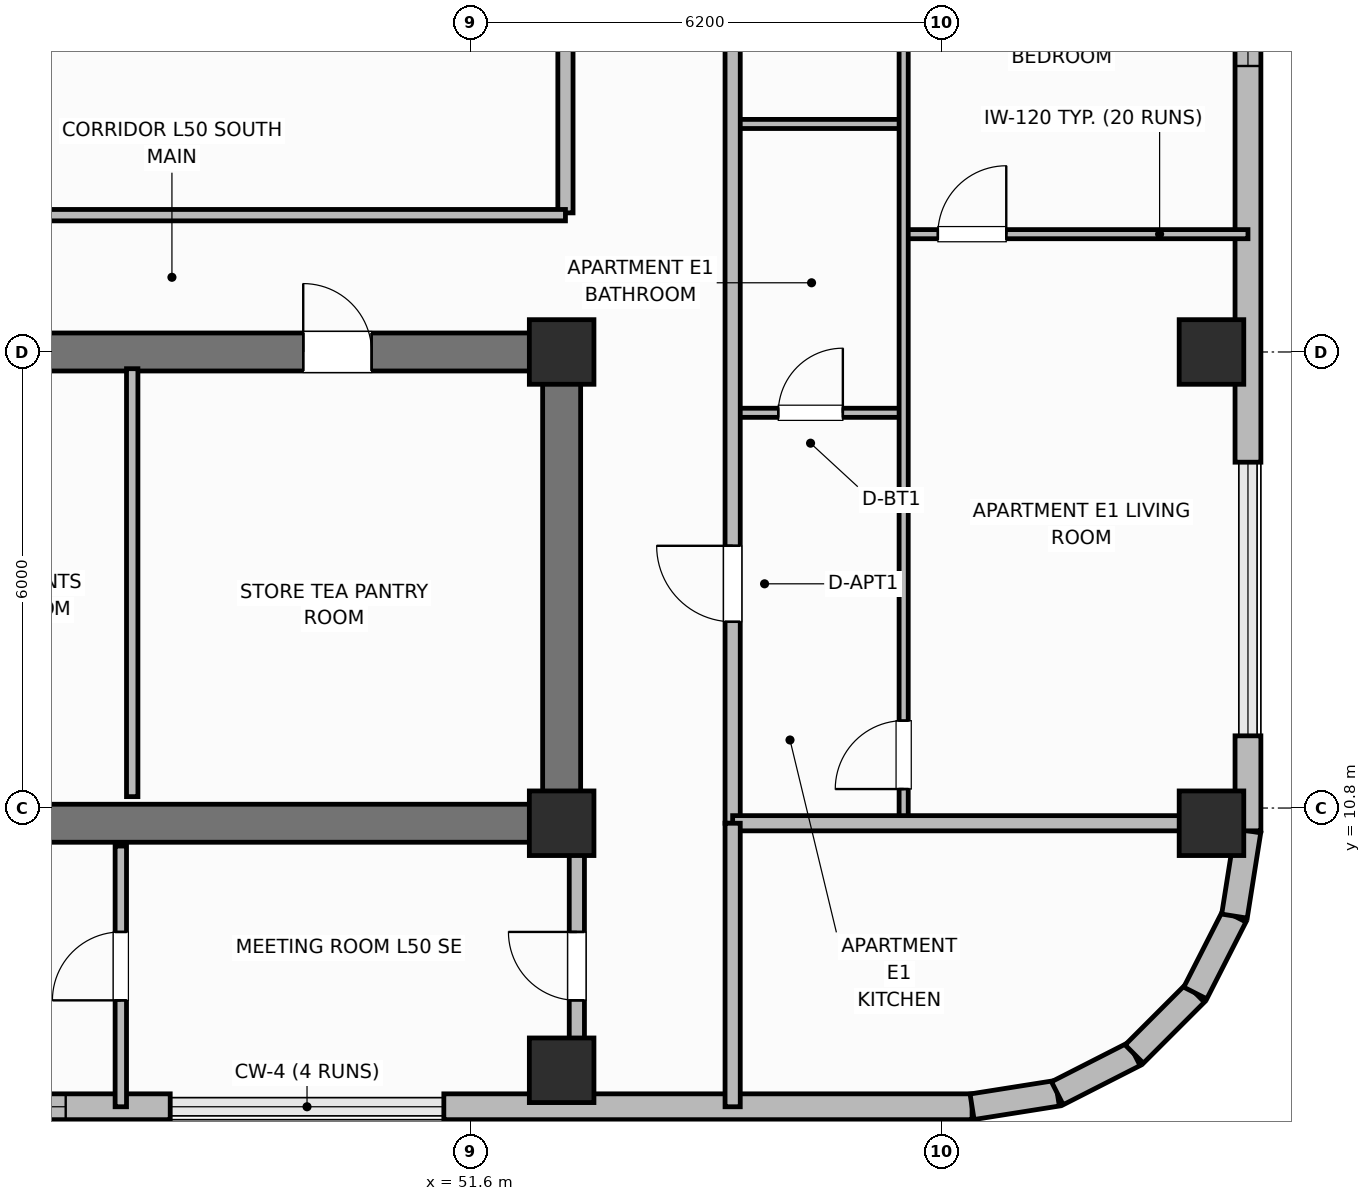
"""IFC4 building model, lengths in metres.
Left out: names, types, materials, properties, quantities, classifications, styles, units other than length and angle.
Written with IfcOpenShell. Run it as: python <this file> out.ifc"""

import sys

from ifc_helpers import new_model, si_unit, direction, frame, frame_2d, origin, origin_2d, place, context, subcontext, project, spatial, rectangle, extrude, element, fill, save


model = new_model("IFC4")
c1 = context("Model", 3, precision=1e-05, world=origin(), true_north=direction((0.0, 1.0)))
c2 = subcontext(c1, "Body", "Model", "MODEL_VIEW")
j1 = project(units=[si_unit("LENGTHUNIT", "METRE"), si_unit("PLANEANGLEUNIT", "RADIAN")], contexts=[c1])
p1 = place(None, origin())
s1 = spatial("IfcSite", under=j1, at=p1, CompositionType="ELEMENT")
p2 = place(p1, origin())
s2 = spatial("IfcBuilding", under=s1, at=p2, CompositionType="ELEMENT")
p3 = place(p2, frame((0.0, 0.0, 203.1)))
s3 = spatial("IfcBuildingStorey", under=s2, at=p3, CompositionType="ELEMENT", Elevation=203.1)
p4 = place(p3, frame((52.8, 10.6, 0.0), z_axis=(0.0, 0.0, 1.0), x_axis=(-1.0, 0.0, 0.0)))
e1 = element("IfcWall", 1, at=p4, inside=s3, PredefinedType="SHEAR", context=c2, shape_type="SweptSolid", body=[
    extrude(rectangle(XDim=27.2, YDim=0.5, at=frame_2d((13.6, 0.0))), origin(), (0.0, 0.0, 1.0), 4.2),
])
p5 = place(p3, frame((52.8, 10.85, 0.0), z_axis=(0.0, 0.0, 1.0), x_axis=(0.0, 1.0, 0.0)))
e2 = element("IfcWall", 2, at=p5, inside=s3, PredefinedType="SHEAR", context=c2, shape_type="SweptSolid", body=[
    extrude(rectangle(XDim=5.7, YDim=0.5, at=frame_2d((2.85, 0.0))), origin(), (0.0, 0.0, 1.0), 4.2),
])
p6 = place(p3, frame((25.6, 16.8, 0.0), z_axis=(0.0, 0.0, 1.0), x_axis=(1.0, 0.0, 0.0)))
e3 = element("IfcWall", 3, at=p6, inside=s3, PredefinedType="SHEAR", context=c2, shape_type="SweptSolid", body=[
    extrude(rectangle(XDim=27.2, YDim=0.5, at=frame_2d((13.6, 0.0))), origin(), (0.0, 0.0, 1.0), 4.2),
])
p7 = place(p6, frame((1.8, 0.0, 0.0)))
e4 = element("IfcOpeningElement", 4, at=p7, cuts=e3, PredefinedType="OPENING", context=c2, shape_type="SweptSolid", body=[
    extrude(rectangle(XDim=1.1, YDim=2.15, at=frame_2d((0.55, 1.075))), frame((0.0, 0.26, 0.0), z_axis=(0.0, -1.0, 0.0), x_axis=(1.0, 0.0, 0.0)), (0.0, 0.0, 1.0), 0.52),
])
p8 = place(p6, frame((5.6, 0.0, 0.0)))
e5 = element("IfcOpeningElement", 5, at=p8, cuts=e3, PredefinedType="OPENING", context=c2, shape_type="SweptSolid", body=[
    extrude(rectangle(XDim=0.85, YDim=2.1, at=frame_2d((0.425, 1.05))), frame((0.0, 0.26, 0.0), z_axis=(0.0, -1.0, 0.0), x_axis=(1.0, 0.0, 0.0)), (0.0, 0.0, 1.0), 0.52),
])
p9 = place(p6, frame((13.0, 0.0, 0.0)))
e6 = element("IfcOpeningElement", 6, at=p9, cuts=e3, PredefinedType="OPENING", context=c2, shape_type="SweptSolid", body=[
    extrude(rectangle(XDim=1.2, YDim=2.15, at=frame_2d((0.6, 1.075))), frame((0.0, 0.26, 0.0), z_axis=(0.0, -1.0, 0.0), x_axis=(1.0, 0.0, 0.0)), (0.0, 0.0, 1.0), 0.52),
])
p10 = place(p6, frame((19.2, 0.0, 0.0)))
e7 = element("IfcOpeningElement", 7, at=p10, cuts=e3, PredefinedType="OPENING", context=c2, shape_type="SweptSolid", body=[
    extrude(rectangle(XDim=0.85, YDim=2.1, at=frame_2d((0.425, 1.05))), frame((0.0, 0.26, 0.0), z_axis=(0.0, -1.0, 0.0), x_axis=(1.0, 0.0, 0.0)), (0.0, 0.0, 1.0), 0.52),
])
p11 = place(p6, frame((23.8, 0.0, 0.0)))
e8 = element("IfcOpeningElement", 8, at=p11, cuts=e3, PredefinedType="OPENING", context=c2, shape_type="SweptSolid", body=[
    extrude(rectangle(XDim=0.9, YDim=2.1, at=frame_2d((0.45, 1.05))), frame((0.0, 0.26, 0.0), z_axis=(0.0, -1.0, 0.0), x_axis=(1.0, 0.0, 0.0)), (0.0, 0.0, 1.0), 0.52),
])
for number, where, z_axis, x_axis in (
    (9, (52.8, 10.6, 0.0), (0.0, 0.0, 1.0), (1.0, 0.0, 0.0)),
    (10, (52.8, 16.8, 0.0), (0.0, 0.0, 1.0), (1.0, 0.0, 0.0)),
    (11, (52.8, 7.35, 0.0), (0.0, 0.0, 1.0), (1.0, 0.0, 0.0)),
    (12, (61.35, 10.6, 0.0), (0.0, 0.0, 1.0), (1.0, 0.0, 0.0)),
    (13, (61.35, 16.8, 0.0), (0.0, 0.0, 1.0), (1.0, 0.0, 0.0)),
):
    element("IfcColumn", number, at=place(p3, frame(where, z_axis=z_axis, x_axis=x_axis)), inside=s3, PredefinedType="COLUMN", context=c2, shape_type="SweptSolid", body=[
        extrude(rectangle(XDim=0.85, YDim=0.85, at=origin_2d()), origin(), (0.0, 0.0, 1.0), 4.2),
    ])
p12 = place(p3, frame((42.4, 6.87, 0.0), z_axis=(0.0, 0.0, 1.0), x_axis=(1.0, 0.0, 0.0)))
e14 = element("IfcWall", 14, at=p12, inside=s3, PredefinedType="SOLIDWALL", context=c2, shape_type="SweptSolid", body=[
    extrude(rectangle(XDim=5.25, YDim=0.34, at=frame_2d((2.625, 0.0))), origin(), (0.0, 0.0, 1.0), 3.22),
])
p13 = place(p12, frame((2.075, 0.0, 0.85)))
e15 = element("IfcOpeningElement", 15, at=p13, cuts=e14, PredefinedType="OPENING", context=c2, shape_type="SweptSolid", body=[
    extrude(rectangle(XDim=1.8, YDim=1.85, at=frame_2d((0.9, 0.925))), frame((0.0, 0.18, 0.0), z_axis=(0.0, -1.0, 0.0), x_axis=(1.0, 0.0, 0.0)), (0.0, 0.0, 1.0), 0.36),
])
p14 = place(p3, frame((51.25, 6.87, 0.0), z_axis=(0.0, 0.0, 1.0), x_axis=(1.0, 0.0, 0.0)))
e16 = element("IfcWall", 16, at=p14, inside=s3, PredefinedType="SOLIDWALL", context=c2, shape_type="SweptSolid", body=[
    extrude(rectangle(XDim=6.95, YDim=0.34, at=frame_2d((3.475, 0.0))), origin(), (0.0, 0.0, 1.0), 3.22),
])
for number, where, z_axis, x_axis in (
    (17, (58.2, 6.87, 0.0), (0.0, 0.0, 1.0), (0.988, 0.156, 0.0)),
    (18, (59.322, 7.048, 0.0), (0.0, 0.0, 1.0), (0.891, 0.454, 0.0)),
):
    element("IfcWall", number, at=place(p3, frame(where, z_axis=z_axis, x_axis=x_axis)), inside=s3, PredefinedType="SOLIDWALL", context=c2, shape_type="SweptSolid", body=[
        extrude(rectangle(XDim=1.136, YDim=0.34, at=frame_2d((0.568, 0.0))), origin(), (0.0, 0.0, 1.0), 3.22),
    ])
p15 = place(p3, frame((60.334, 7.563, 0.0), z_axis=(0.0, 0.0, 1.0), x_axis=(0.707106781187, 0.707106781187, 0.0)))
e19 = element("IfcWall", 19, at=p15, inside=s3, PredefinedType="SOLIDWALL", context=c2, shape_type="SweptSolid", body=[
    extrude(rectangle(XDim=1.135, YDim=0.34, at=frame_2d((0.568, 0.0))), origin(), (0.0, 0.0, 1.0), 3.22),
])
p16 = place(p3, frame((61.137, 8.366, 0.0), z_axis=(0.0, 0.0, 1.0), x_axis=(0.45390646422, 0.891049337433, 0.0)))
e20 = element("IfcWall", 20, at=p16, inside=s3, PredefinedType="SOLIDWALL", context=c2, shape_type="SweptSolid", body=[
    extrude(rectangle(XDim=1.136, YDim=0.34, at=frame_2d((0.568, 0.0))), origin(), (0.0, 0.0, 1.0), 3.22),
])
p17 = place(p3, frame((61.652, 9.378, 0.0), z_axis=(0.0, 0.0, 1.0), x_axis=(0.156514556949, 0.987675651954, 0.0)))
e21 = element("IfcWall", 21, at=p17, inside=s3, PredefinedType="SOLIDWALL", context=c2, shape_type="SweptSolid", body=[
    extrude(rectangle(XDim=1.135, YDim=0.34, at=frame_2d((0.568, 0.0))), origin(), (0.0, 0.0, 1.0), 3.22),
])
p18 = place(p3, frame((61.83, 10.5, 0.0), z_axis=(0.0, 0.0, 1.0), x_axis=(0.0, 1.0, 0.0)))
e22 = element("IfcWall", 22, at=p18, inside=s3, PredefinedType="SOLIDWALL", context=c2, shape_type="SweptSolid", body=[
    extrude(rectangle(XDim=1.25, YDim=0.34, at=frame_2d((0.625, 0.0))), origin(), (0.0, 0.0, 1.0), 3.22),
])
p19 = place(p3, frame((61.83, 15.35, 0.0), z_axis=(0.0, 0.0, 1.0), x_axis=(0.0, 1.0, 0.0)))
e23 = element("IfcWall", 23, at=p19, inside=s3, PredefinedType="SOLIDWALL", context=c2, shape_type="SweptSolid", body=[
    extrude(rectangle(XDim=8.45, YDim=0.34, at=frame_2d((4.225, 0.0))), origin(), (0.0, 0.0, 1.0), 3.22),
])
p20 = place(p19, frame((5.212, 0.0, 0.85)))
e24 = element("IfcOpeningElement", 24, at=p20, cuts=e23, PredefinedType="OPENING", context=c2, shape_type="SweptSolid", body=[
    extrude(rectangle(XDim=1.6, YDim=1.9, at=frame_2d((0.8, 0.95))), frame((0.0, 0.18, 0.0), z_axis=(0.0, -1.0, 0.0), x_axis=(1.0, 0.0, 0.0)), (0.0, 0.0, 1.0), 0.36),
])
p21 = place(p3, frame((47.15, 10.95, 0.0), z_axis=(0.0, 0.0, 1.0), x_axis=(0.0, 1.0, 0.0)))
e25 = element("IfcWall", 25, at=p21, inside=s3, PredefinedType="PARTITIONING", context=c2, shape_type="SweptSolid", body=[
    extrude(rectangle(XDim=5.63, YDim=0.15, at=frame_2d((2.815, 0.0))), origin(), (0.0, 0.0, 1.0), 3.05),
])
p22 = place(p3, frame((52.85, 18.63, 0.0), z_axis=(0.0, 0.0, 1.0), x_axis=(0.0, 1.0, 0.0)))
e26 = element("IfcWall", 26, at=p22, inside=s3, PredefinedType="PARTITIONING", context=c2, shape_type="SweptSolid", body=[
    extrude(rectangle(XDim=19.14, YDim=0.2, at=frame_2d((9.57, 0.0))), origin(), (0.0, 0.0, 1.0), 3.05),
])
p23 = place(p3, frame((31.35, 18.6, 0.0), z_axis=(0.0, 0.0, 1.0), x_axis=(1.0, 0.0, 0.0)))
e27 = element("IfcWall", 27, at=p23, inside=s3, PredefinedType="PARTITIONING", context=c2, shape_type="SweptSolid", body=[
    extrude(rectangle(XDim=21.5, YDim=0.15, at=frame_2d((10.75, 0.0))), origin(), (0.0, 0.0, 1.0), 3.05),
])
p24 = place(p3, frame((55.05, 16.0, 0.0), z_axis=(0.0, 0.0, 1.0), x_axis=(1.0, 0.0, 0.0)))
e28 = element("IfcWall", 28, at=p24, inside=s3, PredefinedType="PARTITIONING", context=c2, shape_type="SweptSolid", body=[
    extrude(rectangle(XDim=2.25, YDim=0.12, at=frame_2d((1.125, 0.0))), origin(), (0.0, 0.0, 1.0), 3.05),
])
p25 = place(p24, frame((0.6, 0.0, 0.0)))
e29 = element("IfcOpeningElement", 29, at=p25, cuts=e28, PredefinedType="OPENING", context=c2, shape_type="SweptSolid", body=[
    extrude(rectangle(XDim=0.85, YDim=2.1, at=frame_2d((0.425, 1.05))), frame((0.0, 0.07, 0.0), z_axis=(0.0, -1.0, 0.0), x_axis=(1.0, 0.0, 0.0)), (0.0, 0.0, 1.0), 0.14),
])
p26 = place(p3, frame((55.05, 19.8, 0.0), z_axis=(0.0, 0.0, 1.0), x_axis=(1.0, 0.0, 0.0)))
e30 = element("IfcWall", 30, at=p26, inside=s3, PredefinedType="PARTITIONING", context=c2, shape_type="SweptSolid", body=[
    extrude(rectangle(XDim=2.25, YDim=0.12, at=frame_2d((1.125, 0.0))), origin(), (0.0, 0.0, 1.0), 3.05),
])
p27 = place(p3, frame((57.3, 18.35, 0.0), z_axis=(0.0, 0.0, 1.0), x_axis=(1.0, 0.0, 0.0)))
e31 = element("IfcWall", 31, at=p27, inside=s3, PredefinedType="PARTITIONING", context=c2, shape_type="SweptSolid", body=[
    extrude(rectangle(XDim=4.53, YDim=0.12, at=frame_2d((2.265, 0.0))), origin(), (0.0, 0.0, 1.0), 3.05),
])
p28 = place(p27, frame((0.45, 0.0, 0.0)))
e32 = element("IfcOpeningElement", 32, at=p28, cuts=e31, PredefinedType="OPENING", context=c2, shape_type="SweptSolid", body=[
    extrude(rectangle(XDim=0.9, YDim=2.1, at=frame_2d((0.45, 1.05))), frame((0.0, 0.07, 0.0), z_axis=(0.0, -1.0, 0.0), x_axis=(1.0, 0.0, 0.0)), (0.0, 0.0, 1.0), 0.14),
])
p29 = place(p3, frame((57.3, 10.64, 0.0), z_axis=(0.0, 0.0, 1.0), x_axis=(0.0, 1.0, 0.0)))
e33 = element("IfcWall", 33, at=p29, inside=s3, PredefinedType="PARTITIONING", context=c2, shape_type="SweptSolid", body=[
    extrude(rectangle(XDim=19.12, YDim=0.12, at=frame_2d((9.56, 0.0))), origin(), (0.0, 0.0, 1.0), 3.05),
])
p30 = place(p29, frame((0.41, 0.0, 0.0)))
e34 = element("IfcOpeningElement", 34, at=p30, cuts=e33, PredefinedType="OPENING", context=c2, shape_type="SweptSolid", body=[
    extrude(rectangle(XDim=0.9, YDim=2.1, at=frame_2d((0.45, 1.05))), frame((0.0, 0.07, 0.0), z_axis=(0.0, -1.0, 0.0), x_axis=(1.0, 0.0, 0.0)), (0.0, 0.0, 1.0), 0.14),
])
p31 = place(p29, frame((13.735, 0.0, 0.0)))
e35 = element("IfcOpeningElement", 35, at=p31, cuts=e33, PredefinedType="OPENING", context=c2, shape_type="SweptSolid", body=[
    extrude(rectangle(XDim=0.82, YDim=2.08, at=frame_2d((0.41, 1.04))), frame((0.0, 0.07, 0.0), z_axis=(0.0, -1.0, 0.0), x_axis=(1.0, 0.0, 0.0)), (0.0, 0.0, 1.0), 0.14),
])
p32 = place(p3, frame((55.05, 10.6, 0.0), z_axis=(0.0, 0.0, 1.0), x_axis=(0.0, 1.0, 0.0)))
e36 = element("IfcWall", 36, at=p32, inside=s3, PredefinedType="PARTITIONING", context=c2, shape_type="SweptSolid", body=[
    extrude(rectangle(XDim=35.2, YDim=0.2, at=frame_2d((17.6, 0.0))), origin(), (0.0, 0.0, 1.0), 3.05),
])
p33 = place(p32, frame((2.65, 0.0, 0.0)))
e37 = element("IfcOpeningElement", 37, at=p33, cuts=e36, PredefinedType="OPENING", context=c2, shape_type="SweptSolid", body=[
    extrude(rectangle(XDim=1.0, YDim=2.15, at=frame_2d((0.5, 1.075))), frame((0.0, 0.11, 0.0), z_axis=(0.0, -1.0, 0.0), x_axis=(1.0, 0.0, 0.0)), (0.0, 0.0, 1.0), 0.22),
])
p34 = place(p32, frame((22.75, 0.0, 0.0)))
e38 = element("IfcOpeningElement", 38, at=p34, cuts=e36, PredefinedType="OPENING", context=c2, shape_type="SweptSolid", body=[
    extrude(rectangle(XDim=1.0, YDim=2.15, at=frame_2d((0.5, 1.075))), frame((0.0, 0.11, 0.0), z_axis=(0.0, -1.0, 0.0), x_axis=(1.0, 0.0, 0.0)), (0.0, 0.0, 1.0), 0.22),
])
p35 = place(p3, frame((55.05, 10.6, 0.0), z_axis=(0.0, 0.0, 1.0), x_axis=(1.0, 0.0, 0.0)))
e39 = element("IfcWall", 39, at=p35, inside=s3, PredefinedType="PARTITIONING", context=c2, shape_type="SweptSolid", body=[
    extrude(rectangle(XDim=6.36, YDim=0.2, at=frame_2d((3.18, 0.0))), origin(), (0.0, 0.0, 1.0), 3.05),
])
p36 = place(p3, frame((55.05, 6.87, 0.0), z_axis=(0.0, 0.0, 1.0), x_axis=(0.0, 1.0, 0.0)))
e40 = element("IfcWall", 40, at=p36, inside=s3, PredefinedType="PARTITIONING", context=c2, shape_type="SweptSolid", body=[
    extrude(rectangle(XDim=3.73, YDim=0.2, at=frame_2d((1.865, 0.0))), origin(), (0.0, 0.0, 1.0), 3.05),
])
p37 = place(p3, frame((47.0, 6.87, 0.0), z_axis=(0.0, 0.0, 1.0), x_axis=(0.0, 1.0, 0.0)))
e41 = element("IfcWall", 41, at=p37, inside=s3, PredefinedType="PARTITIONING", context=c2, shape_type="SweptSolid", body=[
    extrude(rectangle(XDim=3.43, YDim=0.15, at=frame_2d((1.715, 0.0))), origin(), (0.0, 0.0, 1.0), 3.05),
])
p38 = place(p37, frame((1.4, 0.0, 0.0)))
e42 = element("IfcOpeningElement", 42, at=p38, cuts=e41, PredefinedType="OPENING", context=c2, shape_type="SweptSolid", body=[
    extrude(rectangle(XDim=0.9, YDim=2.1, at=frame_2d((0.45, 1.05))), frame((0.0, 0.085, 0.0), z_axis=(0.0, -1.0, 0.0), x_axis=(1.0, 0.0, 0.0)), (0.0, 0.0, 1.0), 0.17),
])
p39 = place(p3, frame((53.0, 7.62, 0.0), z_axis=(0.0, 0.0, 1.0), x_axis=(0.0, 1.0, 0.0)))
e43 = element("IfcWall", 43, at=p39, inside=s3, PredefinedType="PARTITIONING", context=c2, shape_type="SweptSolid", body=[
    extrude(rectangle(XDim=2.68, YDim=0.2, at=frame_2d((1.34, 0.0))), origin(), (0.0, 0.0, 1.0), 3.05),
])
p40 = place(p39, frame((0.65, 0.0, 0.0)))
e44 = element("IfcOpeningElement", 44, at=p40, cuts=e43, PredefinedType="OPENING", context=c2, shape_type="SweptSolid", body=[
    extrude(rectangle(XDim=0.9, YDim=2.1, at=frame_2d((0.45, 1.05))), frame((0.0, 0.11, 0.0), z_axis=(0.0, -1.0, 0.0), x_axis=(1.0, 0.0, 0.0)), (0.0, 0.0, 1.0), 0.22),
])
p41 = place(p13, origin())
e45 = element("IfcWindow", 45, at=p41, inside=s3, PartitioningType="SINGLE_PANEL", PredefinedType="WINDOW", context=c2, shape_type="SweptSolid", body=[
    extrude(rectangle(XDim=1.8, YDim=1.85, at=frame_2d((0.9, 0.925))), frame((0.0, 0.03, 0.0), z_axis=(0.0, -1.0, 0.0), x_axis=(1.0, 0.0, 0.0)), (0.0, 0.0, 1.0), 0.06),
])
fill(e15, e45)
p42 = place(p20, origin())
e46 = element("IfcWindow", 46, at=p42, inside=s3, PartitioningType="SINGLE_PANEL", PredefinedType="WINDOW", context=c2, shape_type="SweptSolid", body=[
    extrude(rectangle(XDim=1.6, YDim=1.9, at=frame_2d((0.8, 0.95))), frame((0.0, 0.03, 0.0), z_axis=(0.0, -1.0, 0.0), x_axis=(1.0, 0.0, 0.0)), (0.0, 0.0, 1.0), 0.06),
])
fill(e24, e46)
p43 = place(p25, origin())
e47 = element("IfcDoor", 47, at=p43, inside=s3, OperationType="SINGLE_SWING_RIGHT", PredefinedType="DOOR", context=c2, shape_type="SweptSolid", body=[
    extrude(rectangle(XDim=0.85, YDim=2.1, at=frame_2d((0.425, 1.05))), frame((0.0, 0.025, 0.0), z_axis=(0.0, -1.0, 0.0), x_axis=(1.0, 0.0, 0.0)), (0.0, 0.0, 1.0), 0.05),
])
fill(e29, e47)
p44 = place(p28, origin())
e48 = element("IfcDoor", 48, at=p44, inside=s3, OperationType="SINGLE_SWING_RIGHT", PredefinedType="DOOR", context=c2, shape_type="SweptSolid", body=[
    extrude(rectangle(XDim=0.9, YDim=2.1, at=frame_2d((0.45, 1.05))), frame((0.0, 0.025, 0.0), z_axis=(0.0, -1.0, 0.0), x_axis=(1.0, 0.0, 0.0)), (0.0, 0.0, 1.0), 0.05),
])
fill(e32, e48)
p45 = place(p30, origin())
e49 = element("IfcDoor", 49, at=p45, inside=s3, OperationType="SINGLE_SWING_LEFT", PredefinedType="DOOR", context=c2, shape_type="SweptSolid", body=[
    extrude(rectangle(XDim=0.9, YDim=2.1, at=frame_2d((0.45, 1.05))), frame((0.0, 0.025, 0.0), z_axis=(0.0, -1.0, 0.0), x_axis=(1.0, 0.0, 0.0)), (0.0, 0.0, 1.0), 0.05),
])
fill(e34, e49)
p46 = place(p33, origin())
e50 = element("IfcDoor", 50, at=p46, inside=s3, OperationType="SINGLE_SWING_RIGHT", PredefinedType="DOOR", context=c2, shape_type="SweptSolid", body=[
    extrude(rectangle(XDim=1.0, YDim=2.15, at=frame_2d((0.5, 1.075))), frame((0.0, 0.025, 0.0), z_axis=(0.0, -1.0, 0.0), x_axis=(1.0, 0.0, 0.0)), (0.0, 0.0, 1.0), 0.05),
])
fill(e37, e50)
p47 = place(p38, origin())
e51 = element("IfcDoor", 51, at=p47, inside=s3, OperationType="SINGLE_SWING_LEFT", PredefinedType="DOOR", context=c2, shape_type="SweptSolid", body=[
    extrude(rectangle(XDim=0.9, YDim=2.1, at=frame_2d((0.45, 1.05))), frame((0.0, 0.025, 0.0), z_axis=(0.0, -1.0, 0.0), x_axis=(1.0, 0.0, 0.0)), (0.0, 0.0, 1.0), 0.05),
])
fill(e42, e51)
p48 = place(p40, origin())
e52 = element("IfcDoor", 52, at=p48, inside=s3, OperationType="SINGLE_SWING_RIGHT", PredefinedType="DOOR", context=c2, shape_type="SweptSolid", body=[
    extrude(rectangle(XDim=0.9, YDim=2.1, at=frame_2d((0.45, 1.05))), frame((0.0, 0.025, 0.0), z_axis=(0.0, -1.0, 0.0), x_axis=(1.0, 0.0, 0.0)), (0.0, 0.0, 1.0), 0.05),
])
fill(e44, e52)
p49 = place(p11, origin())
e53 = element("IfcDoor", 53, at=p49, inside=s3, OperationType="SINGLE_SWING_LEFT", PredefinedType="DOOR", context=c2, shape_type="SweptSolid", body=[
    extrude(rectangle(XDim=0.9, YDim=2.1, at=frame_2d((0.45, 1.05))), frame((0.0, 0.025, 0.0), z_axis=(0.0, -1.0, 0.0), x_axis=(1.0, 0.0, 0.0)), (0.0, 0.0, 1.0), 0.05),
])
fill(e8, e53)
save(model, sys.argv[1])
